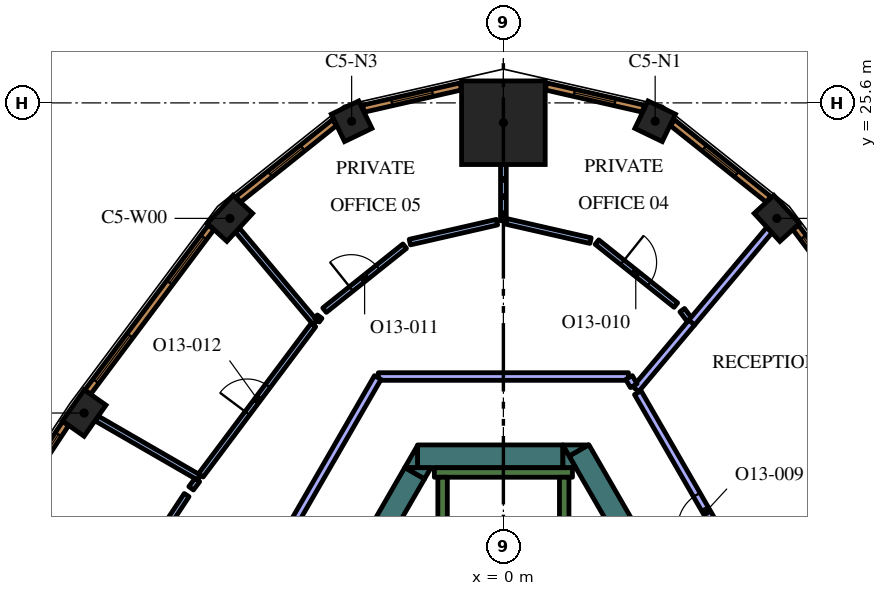
"""IFC4 building model, lengths in metres.
Left out: names, types, materials, properties, quantities, classifications, styles, units other than length and angle.
Written with IfcOpenShell. Run it as: python <this file> out.ifc"""

import sys

from ifc_helpers import new_model, si_unit, direction, frame, frame_2d, origin, origin_2d, place, context, subcontext, project, spatial, polyline, rectangle, outline, extrude, element, fill, save


model = new_model("IFC4")
c1 = context("Model", 3, precision=1e-05, world=origin(), true_north=direction((0.0, 1.0)))
c2 = subcontext(c1, "Body", "Model", "MODEL_VIEW")
j1 = project(units=[si_unit("LENGTHUNIT", "METRE"), si_unit("PLANEANGLEUNIT", "RADIAN")], contexts=[c1])
p1 = place(None, origin())
s1 = spatial("IfcSite", under=j1, at=p1, CompositionType="ELEMENT")
p2 = place(p1, origin())
s2 = spatial("IfcBuilding", under=s1, at=p2, CompositionType="ELEMENT")
p3 = place(p2, frame((0.0, 0.0, 300.6)))
s3 = spatial("IfcBuildingStorey", under=s2, at=p3, CompositionType="ELEMENT", Elevation=300.6)
p4 = place(p3, frame((0.0, 25.078, 0.0), z_axis=(0.0, 0.0, 1.0), x_axis=(0.0, 1.0, 0.0)))
e1 = element("IfcColumn", 1, at=p4, inside=s3, PredefinedType="COLUMN", context=c2, shape_type="SweptSolid", body=[
    extrude(rectangle(XDim=2.2, YDim=2.2, at=origin_2d()), origin(), (0.0, 0.0, 1.0), 4.2),
])
p5 = place(p3, frame((7.195, 22.561, 0.0), z_axis=(0.0, 0.0, 1.0), x_axis=(-0.67580250023, 0.737082750228, 0.0)))
e2 = element("IfcColumn", 2, at=p5, inside=s3, PredefinedType="COLUMN", context=c2, shape_type="SweptSolid", body=[
    extrude(rectangle(XDim=1.0, YDim=0.7, at=origin_2d()), origin(), (0.0, 0.0, 1.0), 4.2),
])
for number, where, z_axis, x_axis in (
    (3, (3.993, 25.116, 0.0), (0.0, 0.0, 1.0), (-0.901, 0.434, 0.0)),
    (4, (-3.993, 25.116, 0.0), (0.0, 0.0, 1.0), (-0.901, -0.434, 0.0)),
):
    element("IfcColumn", number, at=place(p3, frame(where, z_axis=z_axis, x_axis=x_axis)), inside=s3, PredefinedType="COLUMN", context=c2, shape_type="SweptSolid", body=[
        extrude(rectangle(XDim=0.8, YDim=0.8, at=origin_2d()), origin(), (0.0, 0.0, 1.0), 4.2),
    ])
for number, where, z_axis, x_axis in (
    (5, (-7.195, 22.561, 0.0), (0.0, 0.0, 1.0), (-0.676, -0.737, 0.0)),
    (6, (-11.032, 17.44, 0.0), (0.0, 0.0, 1.0), (-0.575, -0.818, 0.0)),
):
    element("IfcColumn", number, at=place(p3, frame(where, z_axis=z_axis, x_axis=x_axis)), inside=s3, PredefinedType="COLUMN", context=c2, shape_type="SweptSolid", body=[
        extrude(rectangle(XDim=1.0, YDim=0.7, at=origin_2d()), origin(), (0.0, 0.0, 1.0), 4.2),
    ])
p6 = place(p3, frame((1.989, 16.456, 0.0), z_axis=(0.0, 0.0, 1.0), x_axis=(0.499973159588, -0.866040899549, 0.0)))
e7 = element("IfcWall", 7, at=p6, inside=s3, PredefinedType="SOLIDWALL", context=c2, shape_type="SweptSolid", body=[
    extrude(rectangle(XDim=6.828, YDim=0.6, at=frame_2d((3.414, 0.0))), origin(), (0.0, 0.0, 1.0), 4.2),
])
p7 = place(p3, origin())
e8 = element("IfcWall", 8, at=p7, inside=s3, PredefinedType="SOLIDWALL", context=c2, shape_type="SweptSolid", body=[
    extrude(outline(polyline([(1.559, 16.6), (2.235, 16.6), (1.728, 16.307), (1.559, 16.6)])), origin(), (0.0, 0.0, 1.0), 4.2),
])
p8 = place(p3, frame((-2.258, 16.3, 0.0), z_axis=(0.0, 0.0, 1.0), x_axis=(1.0, 0.0, 0.0)))
e9 = element("IfcWall", 9, at=p8, inside=s3, PredefinedType="SOLIDWALL", context=c2, shape_type="SweptSolid", body=[
    extrude(rectangle(XDim=3.823, YDim=0.6, at=frame_2d((1.912, 0.0))), origin(), (0.0, 0.0, 1.0), 4.2),
])
e10 = element("IfcWall", 10, at=p7, inside=s3, PredefinedType="SOLIDWALL", context=c2, shape_type="SweptSolid", body=[
    extrude(outline(polyline([(1.905, 16.0), (1.567, 16.0), (1.567, 16.585), (1.905, 16.0)])), origin(), (0.0, 0.0, 1.0), 4.2),
])
e11 = element("IfcWall", 11, at=p7, inside=s3, PredefinedType="SOLIDWALL", context=c2, shape_type="SweptSolid", body=[
    extrude(outline(polyline([(-2.598, 16.0), (-2.26, 16.585), (-2.26, 16.0), (-2.598, 16.0)])), origin(), (0.0, 0.0, 1.0), 4.2),
])
p9 = place(p3, frame((-2.335, 15.855, 0.0), z_axis=(0.0, 0.0, 1.0), x_axis=(-0.499960127962, -0.866048422692, 0.0)))
e12 = element("IfcWall", 12, at=p9, inside=s3, PredefinedType="SOLIDWALL", context=c2, shape_type="SweptSolid", body=[
    extrude(rectangle(XDim=2.934, YDim=0.6, at=frame_2d((1.467, 0.0))), origin(), (0.0, 0.0, 1.0), 4.2),
])
e13 = element("IfcWall", 13, at=p7, inside=s3, PredefinedType="SOLIDWALL", context=c2, shape_type="SweptSolid", body=[
    extrude(outline(polyline([(-1.905, 16.0), (-2.074, 15.707), (-2.581, 16.0), (-1.905, 16.0)])), origin(), (0.0, 0.0, 1.0), 4.2),
])
p10 = place(p3, frame((-1.817, 15.875, 0.0), z_axis=(0.0, 0.0, 1.0), x_axis=(1.0, 0.0, 0.0)))
e14 = element("IfcWall", 14, at=p10, inside=s3, PredefinedType="SOLIDWALL", context=c2, shape_type="SweptSolid", body=[
    extrude(rectangle(XDim=3.634, YDim=0.25, at=frame_2d((1.817, 0.0))), origin(), (0.0, 0.0, 1.0), 4.2),
])
p11 = place(p3, frame((1.6, 8.95, 0.0), z_axis=(0.0, 0.0, 1.0), x_axis=(0.0, 1.0, 0.0)))
e15 = element("IfcWall", 15, at=p11, inside=s3, PredefinedType="SOLIDWALL", context=c2, shape_type="SweptSolid", body=[
    extrude(rectangle(XDim=6.8, YDim=0.25, at=frame_2d((3.4, 0.0))), origin(), (0.0, 0.0, 1.0), 4.2),
])
p12 = place(p3, frame((-1.6, 8.7, 0.0), z_axis=(0.0, 0.0, 1.0), x_axis=(0.0, 1.0, 0.0)))
e16 = element("IfcWall", 16, at=p12, inside=s3, PredefinedType="SOLIDWALL", context=c2, shape_type="SweptSolid", body=[
    extrude(rectangle(XDim=7.05, YDim=0.25, at=frame_2d((3.525, 0.0))), origin(), (0.0, 0.0, 1.0), 4.2),
])
p13 = place(p3, frame((4.95, 19.814, 0.0), z_axis=(0.0, 0.0, 1.0), x_axis=(0.642981953866, 0.765881326971, 0.0)))
e17 = element("IfcWall", 17, at=p13, inside=s3, PredefinedType="PARTITIONING", context=c2, shape_type="SweptSolid", body=[
    extrude(rectangle(XDim=3.188, YDim=0.2, at=frame_2d((1.594, 0.0))), origin(), (0.0, 0.0, 1.0), 3.55),
])
p14 = place(p3, frame((3.483, 18.067, 0.0), z_axis=(0.0, 0.0, 1.0), x_axis=(0.642896944312, 0.765952687177, 0.0)))
e18 = element("IfcWall", 18, at=p14, inside=s3, PredefinedType="PARTITIONING", context=c2, shape_type="SweptSolid", body=[
    extrude(rectangle(XDim=2.29, YDim=0.2, at=frame_2d((1.145, 0.0))), origin(), (0.0, 0.0, 1.0), 3.55),
])
p15 = place(p3, frame((7.188, 11.65, 0.0), z_axis=(0.0, 0.0, 1.0), x_axis=(-0.499989634868, 0.866031388014, 0.0)))
e19 = element("IfcWall", 19, at=p15, inside=s3, PredefinedType="PARTITIONING", context=c2, shape_type="SweptSolid", body=[
    extrude(rectangle(XDim=7.303, YDim=0.2, at=frame_2d((3.652, 0.0))), origin(), (0.0, 0.0, 1.0), 3.55),
])
p16 = place(p15, frame((3.2, 0.0, 0.0)))
e20 = element("IfcOpeningElement", 20, at=p16, cuts=e19, PredefinedType="OPENING", context=c2, shape_type="SweptSolid", body=[
    extrude(rectangle(XDim=1.0, YDim=2.1, at=frame_2d((0.5, 1.05))), frame((0.0, 0.11, 0.0), z_axis=(0.0, -1.0, 0.0), x_axis=(1.0, 0.0, 0.0)), (0.0, 0.0, 1.0), 0.22),
])
p17 = place(p3, frame((0.0, 22.5, 0.0), z_axis=(0.0, 0.0, 1.0), x_axis=(0.0, 1.0, 0.0)))
e21 = element("IfcWall", 21, at=p17, inside=s3, PredefinedType="PARTITIONING", context=c2, shape_type="SweptSolid", body=[
    extrude(rectangle(XDim=1.479, YDim=0.15, at=frame_2d((0.739, 0.0))), origin(), (0.0, 0.0, 1.0), 3.55),
])
p18 = place(p3, frame((4.891, 19.899, 0.0), z_axis=(0.0, 0.0, 1.0), x_axis=(-0.6, 0.8, 0.0)))
e22 = element("IfcWall", 22, at=p18, inside=s3, PredefinedType="PARTITIONING", context=c2, shape_type="SweptSolid", body=[
    extrude(rectangle(XDim=0.309, YDim=0.15, at=frame_2d((0.154, 0.0))), origin(), (0.0, 0.0, 1.0), 3.55),
])
p19 = place(p3, frame((2.462, 21.937, 0.0), z_axis=(0.0, 0.0, 1.0), x_axis=(0.781630346222, -0.62374193531, 0.0)))
e23 = element("IfcWall", 23, at=p19, inside=s3, PredefinedType="PARTITIONING", context=c2, shape_type="SweptSolid", body=[
    extrude(rectangle(XDim=2.656, YDim=0.15, at=frame_2d((1.328, 0.0))), origin(), (0.0, 0.0, 1.0), 3.55),
])
p20 = place(p19, frame((0.857, 0.0, 0.0)))
e24 = element("IfcOpeningElement", 24, at=p20, cuts=e23, PredefinedType="OPENING", context=c2, shape_type="SweptSolid", body=[
    extrude(rectangle(XDim=0.9, YDim=2.1, at=frame_2d((0.45, 1.05))), frame((0.0, 0.085, 0.0), z_axis=(0.0, -1.0, 0.0), x_axis=(1.0, 0.0, 0.0)), (0.0, 0.0, 1.0), 0.17),
])
p21 = place(p3, frame((2.293, 21.976, 0.0), z_axis=(0.0, 0.0, 1.0), x_axis=(-0.974905760283, 0.22261796551, 0.0)))
e25 = element("IfcWall", 25, at=p21, inside=s3, PredefinedType="PARTITIONING", context=c2, shape_type="SweptSolid", body=[
    extrude(rectangle(XDim=2.276, YDim=0.15, at=frame_2d((1.138, 0.0))), origin(), (0.0, 0.0, 1.0), 3.55),
])
p22 = place(p3, frame((-4.952, 19.817, 0.0), z_axis=(0.0, 0.0, 1.0), x_axis=(-0.643023053688, 0.765846820471, 0.0)))
e26 = element("IfcWall", 26, at=p22, inside=s3, PredefinedType="PARTITIONING", context=c2, shape_type="SweptSolid", body=[
    extrude(rectangle(XDim=3.184, YDim=0.15, at=frame_2d((1.592, 0.0))), origin(), (0.0, 0.0, 1.0), 3.55),
])
p23 = place(p3, frame((-0.168, 22.461, 0.0), z_axis=(0.0, 0.0, 1.0), x_axis=(-0.974885550769, -0.222706450069, 0.0)))
e27 = element("IfcWall", 27, at=p23, inside=s3, PredefinedType="PARTITIONING", context=c2, shape_type="SweptSolid", body=[
    extrude(rectangle(XDim=2.353, YDim=0.15, at=frame_2d((1.176, 0.0))), origin(), (0.0, 0.0, 1.0), 3.55),
])
p24 = place(p3, frame((-4.706, 20.146, 0.0), z_axis=(0.0, 0.0, 1.0), x_axis=(0.781592149204, 0.623789798172, 0.0)))
e28 = element("IfcWall", 28, at=p24, inside=s3, PredefinedType="PARTITIONING", context=c2, shape_type="SweptSolid", body=[
    extrude(rectangle(XDim=2.698, YDim=0.15, at=frame_2d((1.349, 0.0))), origin(), (0.0, 0.0, 1.0), 3.55),
])
p25 = place(p24, frame((0.898, 0.0, 0.0)))
e29 = element("IfcOpeningElement", 29, at=p25, cuts=e28, PredefinedType="OPENING", context=c2, shape_type="SweptSolid", body=[
    extrude(rectangle(XDim=0.9, YDim=2.1, at=frame_2d((0.45, 1.05))), frame((0.0, 0.085, 0.0), z_axis=(0.0, -1.0, 0.0), x_axis=(1.0, 0.0, 0.0)), (0.0, 0.0, 1.0), 0.17),
])
p26 = place(p3, frame((-4.834, 19.975, 0.0), z_axis=(0.0, 0.0, 1.0), x_axis=(-0.599349659863, -0.800487342325, 0.0)))
e30 = element("IfcWall", 30, at=p26, inside=s3, PredefinedType="PARTITIONING", context=c2, shape_type="SweptSolid", body=[
    extrude(rectangle(XDim=0.12, YDim=0.15, at=frame_2d((0.06, 0.0))), origin(), (0.0, 0.0, 1.0), 3.55),
])
p27 = place(p3, frame((-8.007, 15.74, 0.0), z_axis=(0.0, 0.0, 1.0), x_axis=(-0.866044607523, 0.499966736674, 0.0)))
e31 = element("IfcWall", 31, at=p27, inside=s3, PredefinedType="PARTITIONING", context=c2, shape_type="SweptSolid", body=[
    extrude(rectangle(XDim=3.115, YDim=0.15, at=frame_2d((1.557, 0.0))), origin(), (0.0, 0.0, 1.0), 3.55),
])
p28 = place(p3, frame((-7.962, 15.8, 0.0), z_axis=(0.0, 0.0, 1.0), x_axis=(0.599541489613, 0.800343677574, 0.0)))
e32 = element("IfcWall", 32, at=p28, inside=s3, PredefinedType="PARTITIONING", context=c2, shape_type="SweptSolid", body=[
    extrude(rectangle(XDim=4.942, YDim=0.15, at=frame_2d((2.471, 0.0))), origin(), (0.0, 0.0, 1.0), 3.55),
])
p29 = place(p28, frame((2.042, 0.0, 0.0)))
e33 = element("IfcOpeningElement", 33, at=p29, cuts=e32, PredefinedType="OPENING", context=c2, shape_type="SweptSolid", body=[
    extrude(rectangle(XDim=0.9, YDim=2.1, at=frame_2d((0.45, 1.05))), frame((0.0, 0.085, 0.0), z_axis=(0.0, -1.0, 0.0), x_axis=(1.0, 0.0, 0.0)), (0.0, 0.0, 1.0), 0.17),
])
p30 = place(p3, frame((-8.052, 15.679, 0.0), z_axis=(0.0, 0.0, 1.0), x_axis=(-0.599004157744, -0.800745914136, 0.0)))
e34 = element("IfcWall", 34, at=p30, inside=s3, PredefinedType="PARTITIONING", context=c2, shape_type="SweptSolid", body=[
    extrude(rectangle(XDim=0.275, YDim=0.15, at=frame_2d((0.137, 0.0))), origin(), (0.0, 0.0, 1.0), 3.55),
])
p31 = place(p3, frame((-11.523, 10.449, 0.0), z_axis=(0.0, 0.0, 1.0), x_axis=(0.550751709023, 0.834669129061, 0.0)))
e35 = element("IfcWall", 35, at=p31, inside=s3, PredefinedType="PARTITIONING", context=c2, shape_type="SweptSolid", body=[
    extrude(rectangle(XDim=5.788, YDim=0.15, at=frame_2d((2.894, 0.0))), origin(), (0.0, 0.0, 1.0), 3.55),
])
p32 = place(p31, frame((2.488, 0.0, 0.0)))
e36 = element("IfcOpeningElement", 36, at=p32, cuts=e35, PredefinedType="OPENING", context=c2, shape_type="SweptSolid", body=[
    extrude(rectangle(XDim=0.9, YDim=2.1, at=frame_2d((0.45, 1.05))), frame((0.0, 0.085, 0.0), z_axis=(0.0, -1.0, 0.0), x_axis=(1.0, 0.0, 0.0)), (0.0, 0.0, 1.0), 0.17),
])
p33 = place(p3, frame((3.291, 18.4, 0.0), z_axis=(0.0, 0.0, 1.0), x_axis=(-1.0, 0.0, 0.0)))
e37 = element("IfcWall", 37, at=p33, inside=s3, PredefinedType="PARTITIONING", context=c2, shape_type="SweptSolid", body=[
    extrude(rectangle(XDim=6.582, YDim=0.2, at=frame_2d((3.291, 0.0))), origin(), (0.0, 0.0, 1.0), 3.55),
])
p34 = place(p3, frame((-3.306, 18.374, 0.0), z_axis=(0.0, 0.0, 1.0), x_axis=(-0.499999798456, -0.866025520146, 0.0)))
e38 = element("IfcWall", 38, at=p34, inside=s3, PredefinedType="PARTITIONING", context=c2, shape_type="SweptSolid", body=[
    extrude(rectangle(XDim=8.229, YDim=0.2, at=frame_2d((4.115, 0.0))), origin(), (0.0, 0.0, 1.0), 3.55),
])
p35 = place(p3, frame((3.43, 18.159, 0.0), z_axis=(0.0, 0.0, 1.0), x_axis=(-0.499949632511, 0.866054481515, 0.0)))
e39 = element("IfcWall", 39, at=p35, inside=s3, PredefinedType="PARTITIONING", context=c2, shape_type="SweptSolid", body=[
    extrude(rectangle(XDim=0.248, YDim=0.2, at=frame_2d((0.124, 0.0))), origin(), (0.0, 0.0, 1.0), 3.55),
])
p36 = place(p3, frame((10.938, 17.99, 0.0), z_axis=(0.0, 0.0, 1.0), x_axis=(-0.599559865294, 0.800329911929, 0.0)))
e40 = element("IfcWall", 40, at=p36, inside=s3, PredefinedType="SOLIDWALL", context=c2, shape_type="SweptSolid", body=[
    extrude(rectangle(XDim=5.415, YDim=0.19, at=frame_2d((2.708, 0.0))), origin(), (0.0, 0.0, 1.0), 3.95),
])
p37 = place(p36, frame((0.358, 0.0, 0.6)))
e41 = element("IfcOpeningElement", 41, at=p37, cuts=e40, PredefinedType="OPENING", context=c2, shape_type="SweptSolid", body=[
    extrude(rectangle(XDim=1.5, YDim=2.85, at=frame_2d((0.75, 1.425))), frame((0.0, 0.105, 0.0), z_axis=(0.0, -1.0, 0.0), x_axis=(1.0, 0.0, 0.0)), (0.0, 0.0, 1.0), 0.21),
])
p38 = place(p36, frame((3.593, 0.0, 0.6)))
e42 = element("IfcOpeningElement", 42, at=p38, cuts=e40, PredefinedType="OPENING", context=c2, shape_type="SweptSolid", body=[
    extrude(rectangle(XDim=1.5, YDim=2.85, at=frame_2d((0.75, 1.425))), frame((0.0, 0.105, 0.0), z_axis=(0.0, -1.0, 0.0), x_axis=(1.0, 0.0, 0.0)), (0.0, 0.0, 1.0), 0.21),
])
p39 = place(p3, frame((6.977, 23.061, 0.0), z_axis=(0.0, 0.0, 1.0), x_axis=(-0.781626234064, 0.623747088349, 0.0)))
e43 = element("IfcWall", 43, at=p39, inside=s3, PredefinedType="SOLIDWALL", context=c2, shape_type="SweptSolid", body=[
    extrude(rectangle(XDim=3.237, YDim=0.19, at=frame_2d((1.618, 0.0))), origin(), (0.0, 0.0, 1.0), 3.95),
])
p40 = place(p39, frame((1.068, 0.0, 0.6)))
e44 = element("IfcOpeningElement", 44, at=p40, cuts=e43, PredefinedType="OPENING", context=c2, shape_type="SweptSolid", body=[
    extrude(rectangle(XDim=1.1, YDim=2.85, at=frame_2d((0.55, 1.425))), frame((0.0, 0.105, 0.0), z_axis=(0.0, -1.0, 0.0), x_axis=(1.0, 0.0, 0.0)), (0.0, 0.0, 1.0), 0.21),
])
p41 = place(p3, frame((3.683, 25.449, 0.0), z_axis=(0.0, 0.0, 1.0), x_axis=(-0.974913273386, 0.222585060988, 0.0)))
e45 = element("IfcWall", 45, at=p41, inside=s3, PredefinedType="SOLIDWALL", context=c2, shape_type="SweptSolid", body=[
    extrude(rectangle(XDim=2.627, YDim=0.19, at=frame_2d((1.313, 0.0))), origin(), (0.0, 0.0, 1.0), 3.95),
])
p42 = place(p41, frame((0.763, 0.0, 0.6)))
e46 = element("IfcOpeningElement", 46, at=p42, cuts=e45, PredefinedType="OPENING", context=c2, shape_type="SweptSolid", body=[
    extrude(rectangle(XDim=1.1, YDim=2.85, at=frame_2d((0.55, 1.425))), frame((0.0, 0.105, 0.0), z_axis=(0.0, -1.0, 0.0), x_axis=(1.0, 0.0, 0.0)), (0.0, 0.0, 1.0), 0.21),
])
p43 = place(p3, frame((-1.122, 26.033, 0.0), z_axis=(0.0, 0.0, 1.0), x_axis=(-0.974913273386, -0.222585060988, 0.0)))
e47 = element("IfcWall", 47, at=p43, inside=s3, PredefinedType="SOLIDWALL", context=c2, shape_type="SweptSolid", body=[
    extrude(rectangle(XDim=2.627, YDim=0.19, at=frame_2d((1.313, 0.0))), origin(), (0.0, 0.0, 1.0), 3.95),
])
p44 = place(p43, frame((0.763, 0.0, 0.6)))
e48 = element("IfcOpeningElement", 48, at=p44, cuts=e47, PredefinedType="OPENING", context=c2, shape_type="SweptSolid", body=[
    extrude(rectangle(XDim=1.1, YDim=2.85, at=frame_2d((0.55, 1.425))), frame((0.0, 0.105, 0.0), z_axis=(0.0, -1.0, 0.0), x_axis=(1.0, 0.0, 0.0)), (0.0, 0.0, 1.0), 0.21),
])
p45 = place(p3, frame((-4.448, 25.08, 0.0), z_axis=(0.0, 0.0, 1.0), x_axis=(-0.781626234064, -0.623747088349, 0.0)))
e49 = element("IfcWall", 49, at=p45, inside=s3, PredefinedType="SOLIDWALL", context=c2, shape_type="SweptSolid", body=[
    extrude(rectangle(XDim=3.237, YDim=0.19, at=frame_2d((1.618, 0.0))), origin(), (0.0, 0.0, 1.0), 3.95),
])
p46 = place(p45, frame((1.068, 0.0, 0.6)))
e50 = element("IfcOpeningElement", 50, at=p46, cuts=e49, PredefinedType="OPENING", context=c2, shape_type="SweptSolid", body=[
    extrude(rectangle(XDim=1.1, YDim=2.85, at=frame_2d((0.55, 1.425))), frame((0.0, 0.105, 0.0), z_axis=(0.0, -1.0, 0.0), x_axis=(1.0, 0.0, 0.0)), (0.0, 0.0, 1.0), 0.21),
])
p47 = place(p3, frame((-7.692, 22.324, 0.0), z_axis=(0.0, 0.0, 1.0), x_axis=(-0.599559865294, -0.800329911929, 0.0)))
e51 = element("IfcWall", 51, at=p47, inside=s3, PredefinedType="SOLIDWALL", context=c2, shape_type="SweptSolid", body=[
    extrude(rectangle(XDim=5.415, YDim=0.19, at=frame_2d((2.708, 0.0))), origin(), (0.0, 0.0, 1.0), 3.95),
])
p48 = place(p47, frame((0.323, 0.0, 0.6)))
e52 = element("IfcOpeningElement", 52, at=p48, cuts=e51, PredefinedType="OPENING", context=c2, shape_type="SweptSolid", body=[
    extrude(rectangle(XDim=1.5, YDim=2.85, at=frame_2d((0.75, 1.425))), frame((0.0, 0.105, 0.0), z_axis=(0.0, -1.0, 0.0), x_axis=(1.0, 0.0, 0.0)), (0.0, 0.0, 1.0), 0.21),
])
p49 = place(p47, frame((3.558, 0.0, 0.6)))
e53 = element("IfcOpeningElement", 53, at=p49, cuts=e51, PredefinedType="OPENING", context=c2, shape_type="SweptSolid", body=[
    extrude(rectangle(XDim=1.5, YDim=2.85, at=frame_2d((0.75, 1.425))), frame((0.0, 0.105, 0.0), z_axis=(0.0, -1.0, 0.0), x_axis=(1.0, 0.0, 0.0)), (0.0, 0.0, 1.0), 0.21),
])
p50 = place(p3, frame((-11.518, 17.166, 0.0), z_axis=(0.0, 0.0, 1.0), x_axis=(-0.550744054781, -0.83467417962, 0.0)))
e54 = element("IfcWall", 54, at=p50, inside=s3, PredefinedType="SOLIDWALL", context=c2, shape_type="SweptSolid", body=[
    extrude(rectangle(XDim=5.406, YDim=0.19, at=frame_2d((2.703, 0.0))), origin(), (0.0, 0.0, 1.0), 3.95),
])
p51 = place(p50, frame((0.346, 0.0, 0.6)))
e55 = element("IfcOpeningElement", 55, at=p51, cuts=e54, PredefinedType="OPENING", context=c2, shape_type="SweptSolid", body=[
    extrude(rectangle(XDim=1.5, YDim=2.85, at=frame_2d((0.75, 1.425))), frame((0.0, 0.105, 0.0), z_axis=(0.0, -1.0, 0.0), x_axis=(1.0, 0.0, 0.0)), (0.0, 0.0, 1.0), 0.21),
])
p52 = place(p50, frame((3.559, 0.0, 0.6)))
e56 = element("IfcOpeningElement", 56, at=p52, cuts=e54, PredefinedType="OPENING", context=c2, shape_type="SweptSolid", body=[
    extrude(rectangle(XDim=1.5, YDim=2.85, at=frame_2d((0.75, 1.425))), frame((0.0, 0.105, 0.0), z_axis=(0.0, -1.0, 0.0), x_axis=(1.0, 0.0, 0.0)), (0.0, 0.0, 1.0), 0.21),
])
p53 = place(p16, origin())
e57 = element("IfcDoor", 57, at=p53, inside=s3, OperationType="SINGLE_SWING_RIGHT", PredefinedType="DOOR", context=c2, shape_type="SweptSolid", body=[
    extrude(rectangle(XDim=1.0, YDim=2.1, at=frame_2d((0.5, 1.05))), frame((0.0, 0.025, 0.0), z_axis=(0.0, -1.0, 0.0), x_axis=(1.0, 0.0, 0.0)), (0.0, 0.0, 1.0), 0.05),
])
fill(e20, e57)
p54 = place(p20, origin())
e58 = element("IfcDoor", 58, at=p54, inside=s3, OperationType="SINGLE_SWING_LEFT", PredefinedType="DOOR", context=c2, shape_type="SweptSolid", body=[
    extrude(rectangle(XDim=0.9, YDim=2.1, at=frame_2d((0.45, 1.05))), frame((0.0, 0.025, 0.0), z_axis=(0.0, -1.0, 0.0), x_axis=(1.0, 0.0, 0.0)), (0.0, 0.0, 1.0), 0.05),
])
fill(e24, e58)
p55 = place(p25, origin())
e59 = element("IfcDoor", 59, at=p55, inside=s3, OperationType="SINGLE_SWING_LEFT", PredefinedType="DOOR", context=c2, shape_type="SweptSolid", body=[
    extrude(rectangle(XDim=0.9, YDim=2.1, at=frame_2d((0.45, 1.05))), frame((0.0, 0.025, 0.0), z_axis=(0.0, -1.0, 0.0), x_axis=(1.0, 0.0, 0.0)), (0.0, 0.0, 1.0), 0.05),
])
fill(e29, e59)
p56 = place(p29, origin())
e60 = element("IfcDoor", 60, at=p56, inside=s3, OperationType="SINGLE_SWING_RIGHT", PredefinedType="DOOR", context=c2, shape_type="SweptSolid", body=[
    extrude(rectangle(XDim=0.9, YDim=2.1, at=frame_2d((0.45, 1.05))), frame((0.0, 0.025, 0.0), z_axis=(0.0, -1.0, 0.0), x_axis=(1.0, 0.0, 0.0)), (0.0, 0.0, 1.0), 0.05),
])
fill(e33, e60)
p57 = place(p38, origin())
e61 = element("IfcWindow", 61, at=p57, inside=s3, PartitioningType="SINGLE_PANEL", PredefinedType="WINDOW", context=c2, shape_type="SweptSolid", body=[
    extrude(rectangle(XDim=1.5, YDim=2.85, at=frame_2d((0.75, 1.425))), frame((0.0, 0.045, 0.0), z_axis=(0.0, -1.0, 0.0), x_axis=(1.0, 0.0, 0.0)), (0.0, 0.0, 1.0), 0.06),
])
fill(e42, e61)
p58 = place(p40, origin())
e62 = element("IfcWindow", 62, at=p58, inside=s3, PartitioningType="SINGLE_PANEL", PredefinedType="WINDOW", context=c2, shape_type="SweptSolid", body=[
    extrude(rectangle(XDim=1.1, YDim=2.85, at=frame_2d((0.55, 1.425))), frame((0.0, 0.045, 0.0), z_axis=(0.0, -1.0, 0.0), x_axis=(1.0, 0.0, 0.0)), (0.0, 0.0, 1.0), 0.06),
])
fill(e44, e62)
p59 = place(p42, origin())
e63 = element("IfcWindow", 63, at=p59, inside=s3, PartitioningType="SINGLE_PANEL", PredefinedType="WINDOW", context=c2, shape_type="SweptSolid", body=[
    extrude(rectangle(XDim=1.1, YDim=2.85, at=frame_2d((0.55, 1.425))), frame((0.0, 0.045, 0.0), z_axis=(0.0, -1.0, 0.0), x_axis=(1.0, 0.0, 0.0)), (0.0, 0.0, 1.0), 0.06),
])
fill(e46, e63)
p60 = place(p44, origin())
e64 = element("IfcWindow", 64, at=p60, inside=s3, PartitioningType="SINGLE_PANEL", PredefinedType="WINDOW", context=c2, shape_type="SweptSolid", body=[
    extrude(rectangle(XDim=1.1, YDim=2.85, at=frame_2d((0.55, 1.425))), frame((0.0, 0.045, 0.0), z_axis=(0.0, -1.0, 0.0), x_axis=(1.0, 0.0, 0.0)), (0.0, 0.0, 1.0), 0.06),
])
fill(e48, e64)
p61 = place(p46, origin())
e65 = element("IfcWindow", 65, at=p61, inside=s3, PartitioningType="SINGLE_PANEL", PredefinedType="WINDOW", context=c2, shape_type="SweptSolid", body=[
    extrude(rectangle(XDim=1.1, YDim=2.85, at=frame_2d((0.55, 1.425))), frame((0.0, 0.045, 0.0), z_axis=(0.0, -1.0, 0.0), x_axis=(1.0, 0.0, 0.0)), (0.0, 0.0, 1.0), 0.06),
])
fill(e50, e65)
p62 = place(p48, origin())
e66 = element("IfcWindow", 66, at=p62, inside=s3, PartitioningType="SINGLE_PANEL", PredefinedType="WINDOW", context=c2, shape_type="SweptSolid", body=[
    extrude(rectangle(XDim=1.5, YDim=2.85, at=frame_2d((0.75, 1.425))), frame((0.0, 0.045, 0.0), z_axis=(0.0, -1.0, 0.0), x_axis=(1.0, 0.0, 0.0)), (0.0, 0.0, 1.0), 0.06),
])
fill(e52, e66)
p63 = place(p49, origin())
e67 = element("IfcWindow", 67, at=p63, inside=s3, PartitioningType="SINGLE_PANEL", PredefinedType="WINDOW", context=c2, shape_type="SweptSolid", body=[
    extrude(rectangle(XDim=1.5, YDim=2.85, at=frame_2d((0.75, 1.425))), frame((0.0, 0.045, 0.0), z_axis=(0.0, -1.0, 0.0), x_axis=(1.0, 0.0, 0.0)), (0.0, 0.0, 1.0), 0.06),
])
fill(e53, e67)
p64 = place(p51, origin())
e68 = element("IfcWindow", 68, at=p64, inside=s3, PartitioningType="SINGLE_PANEL", PredefinedType="WINDOW", context=c2, shape_type="SweptSolid", body=[
    extrude(rectangle(XDim=1.5, YDim=2.85, at=frame_2d((0.75, 1.425))), frame((0.0, 0.045, 0.0), z_axis=(0.0, -1.0, 0.0), x_axis=(1.0, 0.0, 0.0)), (0.0, 0.0, 1.0), 0.06),
])
fill(e55, e68)
save(model, sys.argv[1])
